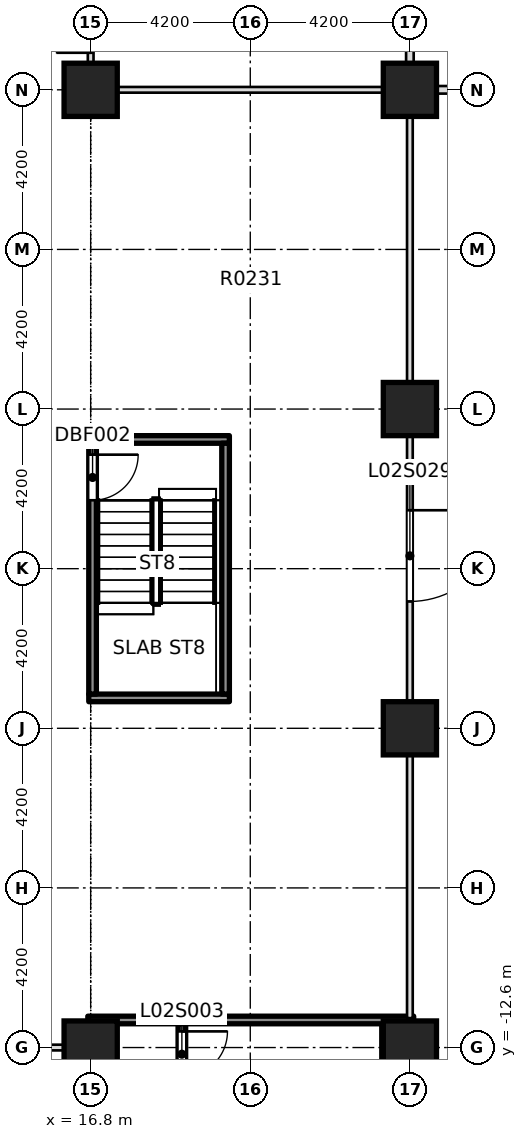
"""IFC4 building model, lengths in metres.
Left out: names, types, materials, properties, quantities, classifications, styles, units other than length and angle.
Written with IfcOpenShell. Run it as: python <this file> out.ifc"""

import sys

from ifc_helpers import new_model, si_unit, direction, frame, frame_2d, origin, origin_2d, place, context, subcontext, project, spatial, rectangle, extrude, element, fill, save


model = new_model("IFC4")
c1 = context("Model", 3, precision=1e-05, world=origin(), true_north=direction((0.0, 1.0)))
c2 = subcontext(c1, "Body", "Model", "MODEL_VIEW")
j1 = project(units=[si_unit("LENGTHUNIT", "METRE"), si_unit("PLANEANGLEUNIT", "RADIAN")], contexts=[c1])
p1 = place(None, origin())
s1 = spatial("IfcSite", under=j1, at=p1, CompositionType="ELEMENT")
p2 = place(p1, origin())
s2 = spatial("IfcBuilding", under=s1, at=p2, CompositionType="ELEMENT")
p3 = place(p2, frame((0.0, 0.0, 12.5)))
s3 = spatial("IfcBuildingStorey", under=s2, at=p3, CompositionType="ELEMENT", Elevation=12.5)
for number, where, z_axis, x_axis in (
    (1, (16.8, -12.6, -0.4), (0.0, 0.0, 1.0), (1.0, 0.0, 0.0)),
    (2, (25.2, -12.6, -0.4), (0.0, 0.0, 1.0), (1.0, 0.0, 0.0)),
    (3, (25.2, -4.2, -0.4), (0.0, 0.0, 1.0), (1.0, 0.0, 0.0)),
    (4, (25.2, 4.2, -0.4), (0.0, 0.0, 1.0), (1.0, 0.0, 0.0)),
    (5, (16.8, 12.6, -0.4), (0.0, 0.0, 1.0), (1.0, 0.0, 0.0)),
    (6, (25.2, 12.6, -0.4), (0.0, 0.0, 1.0), (1.0, 0.0, 0.0)),
):
    element("IfcColumn", number, at=place(p3, frame(where, z_axis=z_axis, x_axis=x_axis)), inside=s3, PredefinedType="COLUMN", context=c2, shape_type="SweptSolid", body=[
        extrude(rectangle(XDim=1.4, YDim=1.4, at=origin_2d()), origin(), (0.0, 0.0, 1.0), 7.5),
    ])
p4 = place(p3, frame((7.275, -12.6, 0.0), z_axis=(0.0, 0.0, 1.0), x_axis=(1.0, 0.0, 0.0)))
e7 = element("IfcWall", 7, at=p4, inside=s3, PredefinedType="PARTITIONING", context=c2, shape_type="SweptSolid", body=[
    extrude(rectangle(XDim=9.625, YDim=0.15, at=frame_2d((4.812, 0.0))), origin(), (0.0, 0.0, 1.0), 7.1),
])
p5 = place(p3, frame((16.725, -11.875, 0.0), z_axis=(0.0, 0.0, 1.0), x_axis=(1.0, 0.0, 0.0)))
e8 = element("IfcWall", 8, at=p5, inside=s3, PredefinedType="SOLIDWALL", context=c2, shape_type="SweptSolid", body=[
    extrude(rectangle(XDim=8.575, YDim=0.2, at=frame_2d((4.288, 0.0))), origin(), (0.0, 0.0, 1.0), 7.1),
])
p6 = place(p3, frame((16.725, 12.6, 0.0), z_axis=(0.0, 0.0, 1.0), x_axis=(1.0, 0.0, 0.0)))
e9 = element("IfcWall", 9, at=p6, inside=s3, PredefinedType="PARTITIONING", context=c2, shape_type="SweptSolid", body=[
    extrude(rectangle(XDim=8.575, YDim=0.15, at=frame_2d((4.288, 0.0))), origin(), (0.0, 0.0, 1.0), 7.1),
])
p7 = place(p3, frame((25.1, 12.6, 0.0), z_axis=(0.0, 0.0, 1.0), x_axis=(1.0, 0.0, 0.0)))
e10 = element("IfcWall", 10, at=p7, inside=s3, PredefinedType="PARTITIONING", context=c2, shape_type="SweptSolid", body=[
    extrude(rectangle(XDim=0.8, YDim=0.2, at=frame_2d((0.4, 0.0))), origin(), (0.0, 0.0, 1.0), 7.1),
])
p8 = place(p3, frame((16.8, -18.125, 0.0), z_axis=(0.0, 0.0, 1.0), x_axis=(0.0, 1.0, 0.0)))
e11 = element("IfcWall", 11, at=p8, inside=s3, PredefinedType="PARTITIONING", context=c2, shape_type="SweptSolid", body=[
    extrude(rectangle(XDim=5.45, YDim=0.2, at=frame_2d((2.725, 0.0))), origin(), (0.0, 0.0, 1.0), 7.1),
])
p9 = place(p3, frame((16.8, -12.525, 0.0), z_axis=(0.0, 0.0, 1.0), x_axis=(0.0, 1.0, 0.0)))
e12 = element("IfcWall", 12, at=p9, inside=s3, PredefinedType="PARTITIONING", context=c2, shape_type="SweptSolid", body=[
    extrude(rectangle(XDim=0.55, YDim=0.15, at=frame_2d((0.275, 0.0))), origin(), (0.0, 0.0, 1.0), 7.1),
])
p10 = place(p3, frame((16.8, 12.675, 0.0), z_axis=(0.0, 0.0, 1.0), x_axis=(0.0, 1.0, 0.0)))
e13 = element("IfcWall", 13, at=p10, inside=s3, PredefinedType="PARTITIONING", context=c2, shape_type="SweptSolid", body=[
    extrude(rectangle(XDim=2.7, YDim=0.15, at=frame_2d((1.35, 0.0))), origin(), (0.0, 0.0, 1.0), 7.1),
])
p11 = place(p10, frame((0.9, 0.0, 0.0)))
e14 = element("IfcOpeningElement", 14, at=p11, cuts=e13, PredefinedType="OPENING", context=c2, shape_type="SweptSolid", body=[
    extrude(rectangle(XDim=0.9, YDim=2.1, at=frame_2d((0.45, 1.05))), frame((0.0, 0.085, 0.0), z_axis=(0.0, -1.0, 0.0), x_axis=(1.0, 0.0, 0.0)), (0.0, 0.0, 1.0), 0.17),
])
p12 = place(p3, frame((19.2, -18.125, 0.0), z_axis=(0.0, 0.0, 1.0), x_axis=(0.0, 1.0, 0.0)))
e15 = element("IfcWall", 15, at=p12, inside=s3, PredefinedType="SOLIDWALL", context=c2, shape_type="SweptSolid", body=[
    extrude(rectangle(XDim=6.15, YDim=0.2, at=frame_2d((3.075, 0.0))), origin(), (0.0, 0.0, 1.0), 7.1),
])
p13 = place(p12, frame((4.75, 0.0, 0.0)))
e16 = element("IfcOpeningElement", 16, at=p13, cuts=e15, PredefinedType="OPENING", context=c2, shape_type="SweptSolid", body=[
    extrude(rectangle(XDim=1.2, YDim=2.1, at=frame_2d((0.6, 1.05))), frame((0.0, 0.11, 0.0), z_axis=(0.0, -1.0, 0.0), x_axis=(1.0, 0.0, 0.0)), (0.0, 0.0, 1.0), 0.22),
])
p14 = place(p3, frame((25.2, -18.125, 0.0), z_axis=(0.0, 0.0, 1.0), x_axis=(0.0, 1.0, 0.0)))
e17 = element("IfcWall", 17, at=p14, inside=s3, PredefinedType="SOLIDWALL", context=c2, shape_type="SweptSolid", body=[
    extrude(rectangle(XDim=6.15, YDim=0.2, at=frame_2d((3.075, 0.0))), origin(), (0.0, 0.0, 1.0), 7.1),
])
p15 = place(p3, frame((25.2, -11.825, 0.0), z_axis=(0.0, 0.0, 1.0), x_axis=(0.0, 1.0, 0.0)))
e18 = element("IfcWall", 18, at=p15, inside=s3, PredefinedType="PARTITIONING", context=c2, shape_type="SweptSolid", body=[
    extrude(rectangle(XDim=24.325, YDim=0.15, at=frame_2d((12.163, 0.0))), origin(), (0.0, 0.0, 1.0), 7.1),
])
p16 = place(p15, frame((10.962, 0.0, 0.0)))
e19 = element("IfcOpeningElement", 19, at=p16, cuts=e18, PredefinedType="OPENING", context=c2, shape_type="SweptSolid", body=[
    extrude(rectangle(XDim=2.4, YDim=2.1, at=frame_2d((1.2, 1.05))), frame((0.0, 0.085, 0.0), z_axis=(0.0, -1.0, 0.0), x_axis=(1.0, 0.0, 0.0)), (0.0, 0.0, 1.0), 0.17),
])
p17 = place(p3, frame((25.2, 12.7, 0.0), z_axis=(0.0, 0.0, 1.0), x_axis=(0.0, 1.0, 0.0)))
e20 = element("IfcWall", 20, at=p17, inside=s3, PredefinedType="PARTITIONING", context=c2, shape_type="SweptSolid", body=[
    extrude(rectangle(XDim=8.975, YDim=0.2, at=frame_2d((4.488, 0.0))), origin(), (0.0, 0.0, 1.0), 7.1),
])
for number, where, z_axis, x_axis in (
    (21, (16.75, -3.4, 0.0), (0.0, 0.0, 1.0), (1.0, 0.0, 0.0)),
    (22, (16.75, 3.4, 0.0), (0.0, 0.0, 1.0), (1.0, 0.0, 0.0)),
):
    element("IfcWall", number, at=place(p3, frame(where, z_axis=z_axis, x_axis=x_axis)), inside=s3, PredefinedType="SOLIDWALL", context=c2, shape_type="SweptSolid", body=[
        extrude(rectangle(XDim=3.7, YDim=0.2, at=frame_2d((1.85, 0.0))), origin(), (0.0, 0.0, 1.0), 7.1),
    ])
p18 = place(p3, frame((16.85, -3.3, 0.0), z_axis=(0.0, 0.0, 1.0), x_axis=(0.0, 1.0, 0.0)))
e23 = element("IfcWall", 23, at=p18, inside=s3, PredefinedType="SOLIDWALL", context=c2, shape_type="SweptSolid", body=[
    extrude(rectangle(XDim=6.6, YDim=0.2, at=frame_2d((3.3, 0.0))), origin(), (0.0, 0.0, 1.0), 7.1),
])
p19 = place(p18, frame((5.1, 0.0, 0.0)))
e24 = element("IfcOpeningElement", 24, at=p19, cuts=e23, PredefinedType="OPENING", context=c2, shape_type="SweptSolid", body=[
    extrude(rectangle(XDim=1.2, YDim=2.1, at=frame_2d((0.6, 1.05))), frame((0.0, 0.11, 0.0), z_axis=(0.0, -1.0, 0.0), x_axis=(1.0, 0.0, 0.0)), (0.0, 0.0, 1.0), 0.22),
])
p20 = place(p3, frame((20.35, -3.3, 0.0), z_axis=(0.0, 0.0, 1.0), x_axis=(0.0, 1.0, 0.0)))
e25 = element("IfcWall", 25, at=p20, inside=s3, PredefinedType="SOLIDWALL", context=c2, shape_type="SweptSolid", body=[
    extrude(rectangle(XDim=6.6, YDim=0.2, at=frame_2d((3.3, 0.0))), origin(), (0.0, 0.0, 1.0), 7.1),
])
p21 = place(p3, frame((25.9, 12.6, 0.0), z_axis=(0.0, 0.0, 1.0), x_axis=(1.0, 0.0, 0.0)))
e26 = element("IfcWall", 26, at=p21, inside=s3, PredefinedType="PARTITIONING", context=c2, shape_type="SweptSolid", body=[
    extrude(rectangle(XDim=23.8, YDim=0.2, at=frame_2d((11.9, 0.0))), origin(), (0.0, 0.0, 1.0), 4.4),
])
p22 = place(p21, frame((0.95, 0.0, 0.0)))
e27 = element("IfcOpeningElement", 27, at=p22, cuts=e26, PredefinedType="OPENING", context=c2, shape_type="SweptSolid", body=[
    extrude(rectangle(XDim=0.9, YDim=2.1, at=frame_2d((0.45, 1.05))), frame((0.0, 0.11, 0.0), z_axis=(0.0, -1.0, 0.0), x_axis=(1.0, 0.0, 0.0)), (0.0, 0.0, 1.0), 0.22),
])
p23 = place(p21, frame((9.35, 0.0, 0.0)))
e28 = element("IfcOpeningElement", 28, at=p23, cuts=e26, PredefinedType="OPENING", context=c2, shape_type="SweptSolid", body=[
    extrude(rectangle(XDim=0.9, YDim=2.1, at=frame_2d((0.45, 1.05))), frame((0.0, 0.11, 0.0), z_axis=(0.0, -1.0, 0.0), x_axis=(1.0, 0.0, 0.0)), (0.0, 0.0, 1.0), 0.22),
])
p24 = place(p13, origin())
e29 = element("IfcDoor", 29, at=p24, inside=s3, OperationType="DOUBLE_DOOR_SINGLE_SWING", PredefinedType="DOOR", context=c2, shape_type="SweptSolid", body=[
    extrude(rectangle(XDim=1.2, YDim=2.1, at=frame_2d((0.6, 1.05))), frame((0.0, 0.025, 0.0), z_axis=(0.0, -1.0, 0.0), x_axis=(1.0, 0.0, 0.0)), (0.0, 0.0, 1.0), 0.05),
])
fill(e16, e29)
p25 = place(p16, origin())
e30 = element("IfcDoor", 30, at=p25, inside=s3, OperationType="DOUBLE_DOOR_SINGLE_SWING", PredefinedType="DOOR", context=c2, shape_type="SweptSolid", body=[
    extrude(rectangle(XDim=2.4, YDim=2.1, at=frame_2d((1.2, 1.05))), frame((0.0, 0.025, 0.0), z_axis=(0.0, -1.0, 0.0), x_axis=(1.0, 0.0, 0.0)), (0.0, 0.0, 1.0), 0.05),
])
fill(e19, e30)
p26 = place(p11, origin())
e31 = element("IfcDoor", 31, at=p26, inside=s3, OperationType="SINGLE_SWING_RIGHT", PredefinedType="DOOR", context=c2, shape_type="SweptSolid", body=[
    extrude(rectangle(XDim=0.9, YDim=2.1, at=frame_2d((0.45, 1.05))), frame((0.0, 0.025, 0.0), z_axis=(0.0, -1.0, 0.0), x_axis=(1.0, 0.0, 0.0)), (0.0, 0.0, 1.0), 0.05),
])
fill(e14, e31)
p27 = place(p19, origin())
e32 = element("IfcDoor", 32, at=p27, inside=s3, OperationType="SINGLE_SWING_LEFT", PredefinedType="DOOR", context=c2, shape_type="SweptSolid", body=[
    extrude(rectangle(XDim=1.2, YDim=2.1, at=frame_2d((0.6, 1.05))), frame((0.0, 0.025, 0.0), z_axis=(0.0, -1.0, 0.0), x_axis=(1.0, 0.0, 0.0)), (0.0, 0.0, 1.0), 0.05),
])
fill(e24, e32)
save(model, sys.argv[1])
